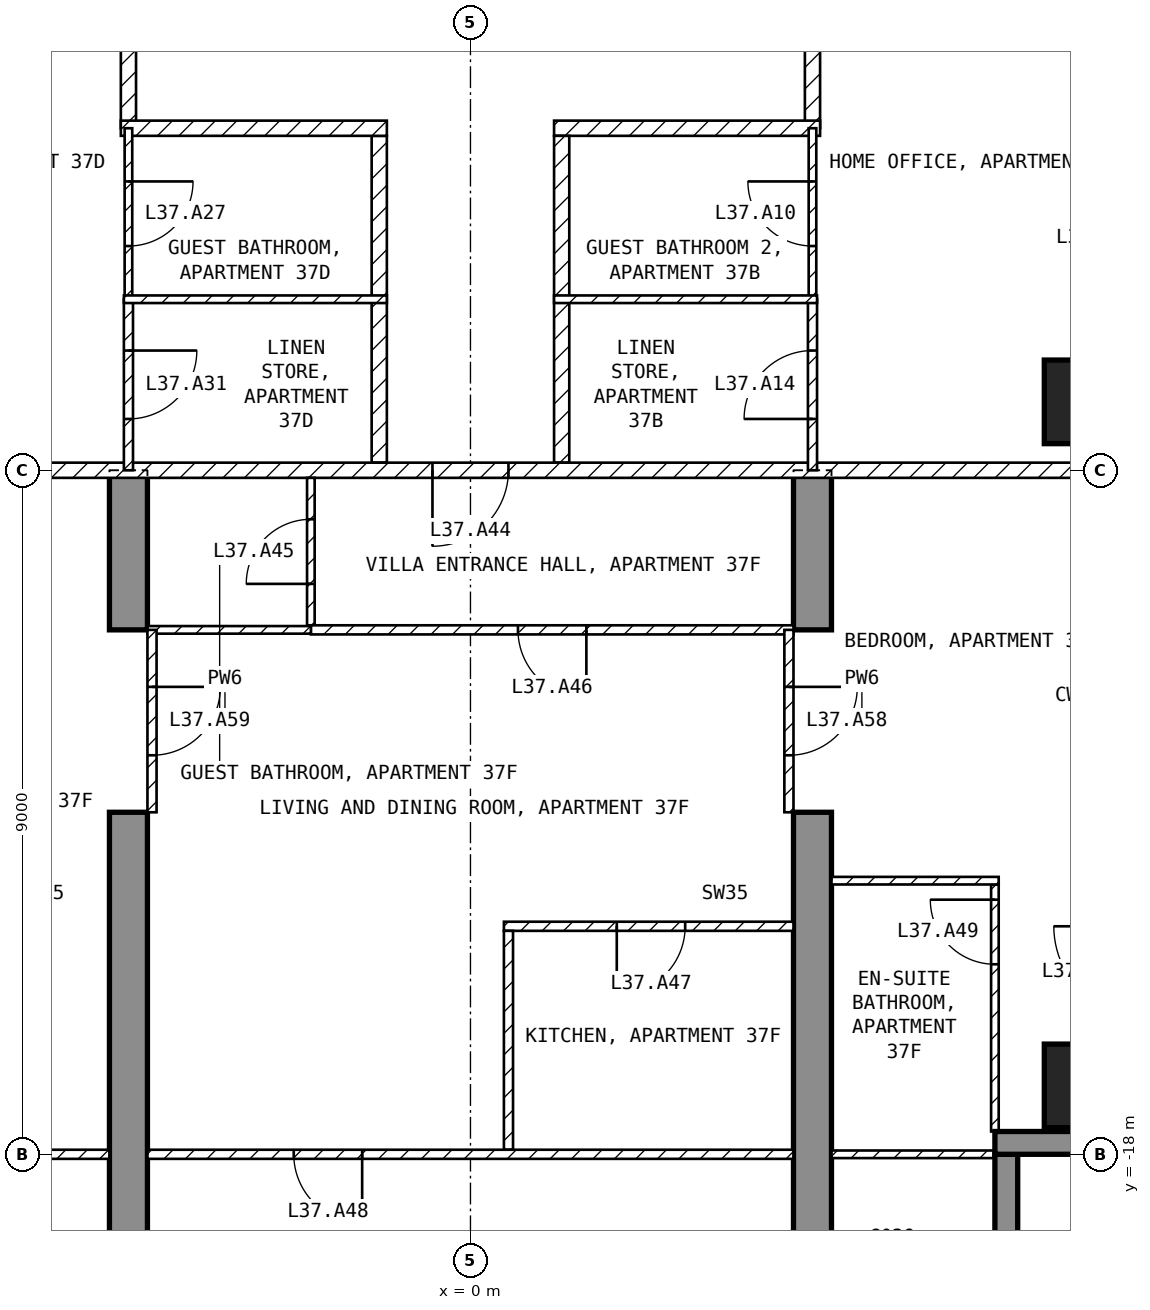
"""IFC4 building model, lengths in metres.
Left out: names, types, materials, properties, quantities, classifications, styles, units other than length and angle.
Written with IfcOpenShell. Run it as: python <this file> out.ifc"""

import sys

from ifc_helpers import new_model, si_unit, direction, frame, frame_2d, origin, origin_2d, place, context, subcontext, project, spatial, polyline, rectangle, outline, extrude, element, fill, save


model = new_model("IFC4")
c1 = context("Model", 3, precision=1e-05, world=origin(), true_north=direction((0.0, 1.0)))
c2 = subcontext(c1, "Body", "Model", "MODEL_VIEW")
j1 = project(units=[si_unit("LENGTHUNIT", "METRE"), si_unit("PLANEANGLEUNIT", "RADIAN")], contexts=[c1])
p1 = place(None, origin())
s1 = spatial("IfcSite", under=j1, at=p1, CompositionType="ELEMENT")
p2 = place(p1, origin())
s2 = spatial("IfcBuilding", under=s1, at=p2, CompositionType="ELEMENT")
p3 = place(p2, frame((0.0, 0.0, 151.4)))
s3 = spatial("IfcBuildingStorey", under=s2, at=p3, CompositionType="ELEMENT", Elevation=151.4)
for number, where, z_axis, x_axis in (
    (1, (8.1, -17.1, -0.25), (0.0, 0.0, 1.0), (1.0, 0.0, 0.0)),
    (2, (8.1, -8.1, -0.25), (0.0, 0.0, 1.0), (1.0, 0.0, 0.0)),
):
    element("IfcColumn", number, at=place(p3, frame(where, z_axis=z_axis, x_axis=x_axis)), inside=s3, PredefinedType="COLUMN", context=c2, shape_type="SweptSolid", body=[
        extrude(rectangle(XDim=1.1, YDim=1.1, at=origin_2d()), origin(), (0.0, 0.0, 1.0), 3.45),
    ])
for number, where, z_axis, x_axis in (
    (3, (-4.75, -20.15, -0.25), (1.0, 0.0, 0.0), (0.0, 1.0, 0.0)),
    (4, (4.25, -20.15, -0.25), (1.0, 0.0, 0.0), (0.0, 1.0, 0.0)),
):
    element("IfcWall", number, at=place(p3, frame(where, z_axis=z_axis, x_axis=x_axis)), inside=s3, PredefinedType="SHEAR", context=c2, shape_type="SweptSolid", body=[
        extrude(outline(polyline([(0.0, 0.0), (6.65, 0.0), (6.65, 2.65), (9.05, 2.65), (9.05, 0.0), (11.15, 0.0), (11.15, 3.45), (0.0, 3.45), (0.0, 0.0)])), origin(), (0.0, 0.0, 1.0), 0.5),
    ])
p4 = place(p3, frame((7.05, -19.8, 0.0), z_axis=(0.0, 0.0, 1.0), x_axis=(0.0, 1.0, 0.0)))
e5 = element("IfcWall", 5, at=p4, inside=s3, PredefinedType="SOLIDWALL", context=c2, shape_type="SweptSolid", body=[
    extrude(rectangle(XDim=1.8, YDim=0.3, at=frame_2d((0.9, 0.0))), origin(), (0.0, 0.0, 1.0), 3.2),
])
p5 = place(p3, frame((6.9, -17.85, 0.0), z_axis=(0.0, 0.0, 1.0), x_axis=(1.0, 0.0, 0.0)))
e6 = element("IfcWall", 6, at=p5, inside=s3, PredefinedType="SOLIDWALL", context=c2, shape_type="SweptSolid", body=[
    extrude(rectangle(XDim=1.85, YDim=0.3, at=frame_2d((0.925, 0.0))), origin(), (0.0, 0.0, 1.0), 3.2),
])
p6 = place(p3, frame((4.5, -1.3, 0.0), z_axis=(0.0, 0.0, 1.0), x_axis=(0.0, -1.0, 0.0)))
e7 = element("IfcWall", 7, at=p6, inside=s3, PredefinedType="PARTITIONING", context=c2, shape_type="SweptSolid", body=[
    extrude(rectangle(XDim=3.2, YDim=0.2, at=frame_2d((1.6, 0.0))), origin(), (0.0, 0.0, 1.0), 3.2),
])
p7 = place(p3, frame((4.6, -4.5, 0.0), z_axis=(0.0, 0.0, 1.0), x_axis=(-1.0, 0.0, 0.0)))
e8 = element("IfcWall", 8, at=p7, inside=s3, PredefinedType="PARTITIONING", context=c2, shape_type="SweptSolid", body=[
    extrude(rectangle(XDim=3.5, YDim=0.2, at=frame_2d((1.75, 0.0))), origin(), (0.0, 0.0, 1.0), 3.2),
])
p8 = place(p3, frame((1.2, -4.6, 0.0), z_axis=(0.0, 0.0, 1.0), x_axis=(0.0, -1.0, 0.0)))
e9 = element("IfcWall", 9, at=p8, inside=s3, PredefinedType="PARTITIONING", context=c2, shape_type="SweptSolid", body=[
    extrude(rectangle(XDim=4.3, YDim=0.2, at=frame_2d((2.15, 0.0))), origin(), (0.0, 0.0, 1.0), 3.2),
])
p9 = place(p3, frame((-4.5, -4.5, 0.0), z_axis=(0.0, 0.0, 1.0), x_axis=(0.0, 1.0, 0.0)))
e10 = element("IfcWall", 10, at=p9, inside=s3, PredefinedType="PARTITIONING", context=c2, shape_type="SweptSolid", body=[
    extrude(rectangle(XDim=3.2, YDim=0.2, at=frame_2d((1.6, 0.0))), origin(), (0.0, 0.0, 1.0), 3.2),
])
p10 = place(p3, frame((-1.2, -8.9, 0.0), z_axis=(0.0, 0.0, 1.0), x_axis=(0.0, 1.0, 0.0)))
e11 = element("IfcWall", 11, at=p10, inside=s3, PredefinedType="PARTITIONING", context=c2, shape_type="SweptSolid", body=[
    extrude(rectangle(XDim=4.3, YDim=0.2, at=frame_2d((2.15, 0.0))), origin(), (0.0, 0.0, 1.0), 3.2),
])
p11 = place(p3, frame((-1.1, -4.5, 0.0), z_axis=(0.0, 0.0, 1.0), x_axis=(-1.0, 0.0, 0.0)))
e12 = element("IfcWall", 12, at=p11, inside=s3, PredefinedType="PARTITIONING", context=c2, shape_type="SweptSolid", body=[
    extrude(rectangle(XDim=3.5, YDim=0.2, at=frame_2d((1.75, 0.0))), origin(), (0.0, 0.0, 1.0), 3.2),
])
p12 = place(p3, frame((8.92, -9.0, 0.0), z_axis=(0.0, 0.0, 1.0), x_axis=(-1.0, 0.0, 0.0)))
e13 = element("IfcWall", 13, at=p12, inside=s3, PredefinedType="PARTITIONING", context=c2, shape_type="SweptSolid", body=[
    extrude(rectangle(XDim=17.84, YDim=0.2, at=frame_2d((8.92, 0.0))), origin(), (0.0, 0.0, 1.0), 3.2),
])
p13 = place(p12, frame((8.42, 0.0, 0.0)))
e14 = element("IfcOpeningElement", 14, at=p13, cuts=e13, PredefinedType="OPENING", context=c2, shape_type="SweptSolid", body=[
    extrude(rectangle(XDim=1.0, YDim=2.1, at=frame_2d((0.5, 1.05))), frame((0.0, 0.11, 0.0), z_axis=(0.0, -1.0, 0.0), x_axis=(1.0, 0.0, 0.0)), (0.0, 0.0, 1.0), 0.22),
])
p14 = place(p3, frame((4.5, -6.75, 0.0), z_axis=(0.0, 0.0, 1.0), x_axis=(0.0, 1.0, 0.0)))
e15 = element("IfcWall", 15, at=p14, inside=s3, PredefinedType="PARTITIONING", context=c2, shape_type="SweptSolid", body=[
    extrude(rectangle(XDim=2.25, YDim=0.1, at=frame_2d((1.125, 0.0))), origin(), (0.0, 0.0, 1.0), 3.2),
])
p15 = place(p14, frame((0.7, 0.0, 0.0)))
e16 = element("IfcOpeningElement", 16, at=p15, cuts=e15, PredefinedType="OPENING", context=c2, shape_type="SweptSolid", body=[
    extrude(rectangle(XDim=0.85, YDim=2.1, at=frame_2d((0.425, 1.05))), frame((0.0, 0.06, 0.0), z_axis=(0.0, -1.0, 0.0), x_axis=(1.0, 0.0, 0.0)), (0.0, 0.0, 1.0), 0.12),
])
p16 = place(p3, frame((4.5, -9.0, 0.0), z_axis=(0.0, 0.0, 1.0), x_axis=(0.0, 1.0, 0.0)))
e17 = element("IfcWall", 17, at=p16, inside=s3, PredefinedType="PARTITIONING", context=c2, shape_type="SweptSolid", body=[
    extrude(rectangle(XDim=2.25, YDim=0.12, at=frame_2d((1.125, 0.0))), origin(), (0.0, 0.0, 1.0), 3.2),
])
p17 = place(p16, frame((0.675, 0.0, 0.0)))
e18 = element("IfcOpeningElement", 18, at=p17, cuts=e17, PredefinedType="OPENING", context=c2, shape_type="SweptSolid", body=[
    extrude(rectangle(XDim=0.9, YDim=2.1, at=frame_2d((0.45, 1.05))), frame((0.0, 0.07, 0.0), z_axis=(0.0, -1.0, 0.0), x_axis=(1.0, 0.0, 0.0)), (0.0, 0.0, 1.0), 0.14),
])
p18 = place(p3, frame((4.56, -6.75, 0.0), z_axis=(0.0, 0.0, 1.0), x_axis=(-1.0, 0.0, 0.0)))
e19 = element("IfcWall", 19, at=p18, inside=s3, PredefinedType="PARTITIONING", context=c2, shape_type="SweptSolid", body=[
    extrude(rectangle(XDim=3.46, YDim=0.1, at=frame_2d((1.73, 0.0))), origin(), (0.0, 0.0, 1.0), 3.2),
])
p19 = place(p3, frame((-4.5, -4.5, 0.0), z_axis=(0.0, 0.0, 1.0), x_axis=(0.0, -1.0, 0.0)))
e20 = element("IfcWall", 20, at=p19, inside=s3, PredefinedType="PARTITIONING", context=c2, shape_type="SweptSolid", body=[
    extrude(rectangle(XDim=2.25, YDim=0.1, at=frame_2d((1.125, 0.0))), origin(), (0.0, 0.0, 1.0), 3.2),
])
p20 = place(p19, frame((0.7, 0.0, 0.0)))
e21 = element("IfcOpeningElement", 21, at=p20, cuts=e20, PredefinedType="OPENING", context=c2, shape_type="SweptSolid", body=[
    extrude(rectangle(XDim=0.85, YDim=2.1, at=frame_2d((0.425, 1.05))), frame((0.0, 0.06, 0.0), z_axis=(0.0, -1.0, 0.0), x_axis=(1.0, 0.0, 0.0)), (0.0, 0.0, 1.0), 0.12),
])
p21 = place(p3, frame((-4.5, -6.75, 0.0), z_axis=(0.0, 0.0, 1.0), x_axis=(0.0, -1.0, 0.0)))
e22 = element("IfcWall", 22, at=p21, inside=s3, PredefinedType="PARTITIONING", context=c2, shape_type="SweptSolid", body=[
    extrude(rectangle(XDim=2.25, YDim=0.12, at=frame_2d((1.125, 0.0))), origin(), (0.0, 0.0, 1.0), 3.2),
])
p22 = place(p21, frame((0.675, 0.0, 0.0)))
e23 = element("IfcOpeningElement", 23, at=p22, cuts=e22, PredefinedType="OPENING", context=c2, shape_type="SweptSolid", body=[
    extrude(rectangle(XDim=0.9, YDim=2.1, at=frame_2d((0.45, 1.05))), frame((0.0, 0.07, 0.0), z_axis=(0.0, -1.0, 0.0), x_axis=(1.0, 0.0, 0.0)), (0.0, 0.0, 1.0), 0.14),
])
p23 = place(p3, frame((-1.1, -6.75, 0.0), z_axis=(0.0, 0.0, 1.0), x_axis=(-1.0, 0.0, 0.0)))
e24 = element("IfcWall", 24, at=p23, inside=s3, PredefinedType="PARTITIONING", context=c2, shape_type="SweptSolid", body=[
    extrude(rectangle(XDim=3.46, YDim=0.1, at=frame_2d((1.73, 0.0))), origin(), (0.0, 0.0, 1.0), 3.2),
])
p24 = place(p3, frame((-2.1, -11.04, 0.0), z_axis=(0.0, 0.0, 1.0), x_axis=(0.0, 1.0, 0.0)))
e25 = element("IfcWall", 25, at=p24, inside=s3, PredefinedType="PARTITIONING", context=c2, shape_type="SweptSolid", body=[
    extrude(rectangle(XDim=1.94, YDim=0.1, at=frame_2d((0.97, 0.0))), origin(), (0.0, 0.0, 1.0), 3.2),
])
p25 = place(p24, frame((0.545, 0.0, 0.0)))
e26 = element("IfcOpeningElement", 26, at=p25, cuts=e25, PredefinedType="OPENING", context=c2, shape_type="SweptSolid", body=[
    extrude(rectangle(XDim=0.85, YDim=2.1, at=frame_2d((0.425, 1.05))), frame((0.0, 0.06, 0.0), z_axis=(0.0, -1.0, 0.0), x_axis=(1.0, 0.0, 0.0)), (0.0, 0.0, 1.0), 0.12),
])
p26 = place(p3, frame((4.25, -11.1, 0.0), z_axis=(0.0, 0.0, 1.0), x_axis=(-1.0, 0.0, 0.0)))
e27 = element("IfcWall", 27, at=p26, inside=s3, PredefinedType="PARTITIONING", context=c2, shape_type="SweptSolid", body=[
    extrude(rectangle(XDim=6.35, YDim=0.12, at=frame_2d((3.175, 0.0))), origin(), (0.0, 0.0, 1.0), 3.2),
])
p27 = place(p26, frame((2.725, 0.0, 0.0)))
e28 = element("IfcOpeningElement", 28, at=p27, cuts=e27, PredefinedType="OPENING", context=c2, shape_type="SweptSolid", body=[
    extrude(rectangle(XDim=0.9, YDim=2.1, at=frame_2d((0.45, 1.05))), frame((0.0, 0.07, 0.0), z_axis=(0.0, -1.0, 0.0), x_axis=(1.0, 0.0, 0.0)), (0.0, 0.0, 1.0), 0.14),
])
p28 = place(p3, frame((-2.1, -11.1, 0.0), z_axis=(0.0, 0.0, 1.0), x_axis=(-1.0, 0.0, 0.0)))
e29 = element("IfcWall", 29, at=p28, inside=s3, PredefinedType="PARTITIONING", context=c2, shape_type="SweptSolid", body=[
    extrude(rectangle(XDim=2.15, YDim=0.1, at=frame_2d((1.075, 0.0))), origin(), (0.0, 0.0, 1.0), 3.2),
])
p29 = place(p3, frame((4.25, -15.0, 0.0), z_axis=(0.0, 0.0, 1.0), x_axis=(-1.0, 0.0, 0.0)))
e30 = element("IfcWall", 30, at=p29, inside=s3, PredefinedType="PARTITIONING", context=c2, shape_type="SweptSolid", body=[
    extrude(rectangle(XDim=3.81, YDim=0.12, at=frame_2d((1.905, 0.0))), origin(), (0.0, 0.0, 1.0), 3.2),
])
p30 = place(p29, frame((1.425, 0.0, 0.0)))
e31 = element("IfcOpeningElement", 31, at=p30, cuts=e30, PredefinedType="OPENING", context=c2, shape_type="SweptSolid", body=[
    extrude(rectangle(XDim=0.9, YDim=2.1, at=frame_2d((0.45, 1.05))), frame((0.0, 0.07, 0.0), z_axis=(0.0, -1.0, 0.0), x_axis=(1.0, 0.0, 0.0)), (0.0, 0.0, 1.0), 0.14),
])
p31 = place(p3, frame((0.5, -15.06, 0.0), z_axis=(0.0, 0.0, 1.0), x_axis=(0.0, -1.0, 0.0)))
e32 = element("IfcWall", 32, at=p31, inside=s3, PredefinedType="PARTITIONING", context=c2, shape_type="SweptSolid", body=[
    extrude(rectangle(XDim=2.88, YDim=0.12, at=frame_2d((1.44, 0.0))), origin(), (0.0, 0.0, 1.0), 3.2),
])
p32 = place(p3, frame((4.25, -18.0, 0.0), z_axis=(0.0, 0.0, 1.0), x_axis=(-1.0, 0.0, 0.0)))
e33 = element("IfcWall", 33, at=p32, inside=s3, PredefinedType="PARTITIONING", context=c2, shape_type="SweptSolid", body=[
    extrude(rectangle(XDim=8.5, YDim=0.12, at=frame_2d((4.25, 0.0))), origin(), (0.0, 0.0, 1.0), 3.2),
])
p33 = place(p32, frame((5.675, 0.0, 0.0)))
e34 = element("IfcOpeningElement", 34, at=p33, cuts=e33, PredefinedType="OPENING", context=c2, shape_type="SweptSolid", body=[
    extrude(rectangle(XDim=0.9, YDim=2.1, at=frame_2d((0.45, 1.05))), frame((0.0, 0.07, 0.0), z_axis=(0.0, -1.0, 0.0), x_axis=(1.0, 0.0, 0.0)), (0.0, 0.0, 1.0), 0.14),
])
p34 = place(p3, frame((6.9, -17.7, 0.0), z_axis=(0.0, 0.0, 1.0), x_axis=(0.0, 1.0, 0.0)))
e35 = element("IfcWall", 35, at=p34, inside=s3, PredefinedType="PARTITIONING", context=c2, shape_type="SweptSolid", body=[
    extrude(rectangle(XDim=3.25, YDim=0.1, at=frame_2d((1.625, 0.0))), origin(), (0.0, 0.0, 1.0), 3.2),
])
p35 = place(p34, frame((2.2, 0.0, 0.0)))
e36 = element("IfcOpeningElement", 36, at=p35, cuts=e35, PredefinedType="OPENING", context=c2, shape_type="SweptSolid", body=[
    extrude(rectangle(XDim=0.85, YDim=2.1, at=frame_2d((0.425, 1.05))), frame((0.0, 0.06, 0.0), z_axis=(0.0, -1.0, 0.0), x_axis=(1.0, 0.0, 0.0)), (0.0, 0.0, 1.0), 0.12),
])
p36 = place(p3, frame((6.95, -14.4, 0.0), z_axis=(0.0, 0.0, 1.0), x_axis=(-1.0, 0.0, 0.0)))
e37 = element("IfcWall", 37, at=p36, inside=s3, PredefinedType="PARTITIONING", context=c2, shape_type="SweptSolid", body=[
    extrude(rectangle(XDim=2.2, YDim=0.1, at=frame_2d((1.1, 0.0))), origin(), (0.0, 0.0, 1.0), 3.2),
])
p37 = place(p3, frame((7.12, -18.0, 0.0), z_axis=(0.0, 0.0, 1.0), x_axis=(-1.0, 0.0, 0.0)))
e38 = element("IfcWall", 38, at=p37, inside=s3, PredefinedType="PARTITIONING", context=c2, shape_type="SweptSolid", body=[
    extrude(rectangle(XDim=2.37, YDim=0.1, at=frame_2d((1.185, 0.0))), origin(), (0.0, 0.0, 1.0), 3.2),
])
p38 = place(p3, frame((-4.75, -18.0, 0.0), z_axis=(0.0, 0.0, 1.0), x_axis=(-1.0, 0.0, 0.0)))
e39 = element("IfcWall", 39, at=p38, inside=s3, PredefinedType="PARTITIONING", context=c2, shape_type="SweptSolid", body=[
    extrude(rectangle(XDim=2.37, YDim=0.12, at=frame_2d((1.185, 0.0))), origin(), (0.0, 0.0, 1.0), 3.2),
])
p39 = place(p3, frame((4.19, -11.1, 0.0), z_axis=(0.0, 0.0, 1.0), x_axis=(0.0, -1.0, 0.0)))
e40 = element("IfcWall", 40, at=p39, inside=s3, PredefinedType="PARTITIONING", context=c2, shape_type="SweptSolid", body=[
    extrude(rectangle(XDim=2.4, YDim=0.12, at=frame_2d((1.2, 0.0))), origin(), (0.0, 0.0, 1.0), 2.4),
])
p40 = place(p39, frame((0.75, 0.0, 0.0)))
e41 = element("IfcOpeningElement", 41, at=p40, cuts=e40, PredefinedType="OPENING", context=c2, shape_type="SweptSolid", body=[
    extrude(rectangle(XDim=0.9, YDim=2.1, at=frame_2d((0.45, 1.05))), frame((0.0, 0.07, 0.0), z_axis=(0.0, -1.0, 0.0), x_axis=(1.0, 0.0, 0.0)), (0.0, 0.0, 1.0), 0.14),
])
p41 = place(p3, frame((-4.19, -11.1, 0.0), z_axis=(0.0, 0.0, 1.0), x_axis=(0.0, -1.0, 0.0)))
e42 = element("IfcWall", 42, at=p41, inside=s3, PredefinedType="PARTITIONING", context=c2, shape_type="SweptSolid", body=[
    extrude(rectangle(XDim=2.4, YDim=0.12, at=frame_2d((1.2, 0.0))), origin(), (0.0, 0.0, 1.0), 2.4),
])
p42 = place(p41, frame((0.75, 0.0, 0.0)))
e43 = element("IfcOpeningElement", 43, at=p42, cuts=e42, PredefinedType="OPENING", context=c2, shape_type="SweptSolid", body=[
    extrude(rectangle(XDim=0.9, YDim=2.1, at=frame_2d((0.45, 1.05))), frame((0.0, 0.07, 0.0), z_axis=(0.0, -1.0, 0.0), x_axis=(1.0, 0.0, 0.0)), (0.0, 0.0, 1.0), 0.14),
])
p43 = place(p15, origin())
e44 = element("IfcDoor", 44, at=p43, inside=s3, OperationType="SINGLE_SWING_RIGHT", PredefinedType="DOOR", context=c2, shape_type="SweptSolid", body=[
    extrude(rectangle(XDim=0.85, YDim=2.1, at=frame_2d((0.425, 1.05))), frame((0.0, 0.025, 0.0), z_axis=(0.0, -1.0, 0.0), x_axis=(1.0, 0.0, 0.0)), (0.0, 0.0, 1.0), 0.05),
])
fill(e16, e44)
p44 = place(p17, origin())
e45 = element("IfcDoor", 45, at=p44, inside=s3, OperationType="SINGLE_SWING_LEFT", PredefinedType="DOOR", context=c2, shape_type="SweptSolid", body=[
    extrude(rectangle(XDim=0.9, YDim=2.1, at=frame_2d((0.45, 1.05))), frame((0.0, 0.025, 0.0), z_axis=(0.0, -1.0, 0.0), x_axis=(1.0, 0.0, 0.0)), (0.0, 0.0, 1.0), 0.05),
])
fill(e18, e45)
p45 = place(p20, origin())
e46 = element("IfcDoor", 46, at=p45, inside=s3, OperationType="SINGLE_SWING_LEFT", PredefinedType="DOOR", context=c2, shape_type="SweptSolid", body=[
    extrude(rectangle(XDim=0.85, YDim=2.1, at=frame_2d((0.425, 1.05))), frame((0.0, 0.025, 0.0), z_axis=(0.0, -1.0, 0.0), x_axis=(1.0, 0.0, 0.0)), (0.0, 0.0, 1.0), 0.05),
])
fill(e21, e46)
p46 = place(p22, origin())
e47 = element("IfcDoor", 47, at=p46, inside=s3, OperationType="SINGLE_SWING_LEFT", PredefinedType="DOOR", context=c2, shape_type="SweptSolid", body=[
    extrude(rectangle(XDim=0.9, YDim=2.1, at=frame_2d((0.45, 1.05))), frame((0.0, 0.025, 0.0), z_axis=(0.0, -1.0, 0.0), x_axis=(1.0, 0.0, 0.0)), (0.0, 0.0, 1.0), 0.05),
])
fill(e23, e47)
p47 = place(p13, origin())
e48 = element("IfcDoor", 48, at=p47, inside=s3, OperationType="SINGLE_SWING_RIGHT", PredefinedType="DOOR", context=c2, shape_type="SweptSolid", body=[
    extrude(rectangle(XDim=1.0, YDim=2.1, at=frame_2d((0.5, 1.05))), frame((0.0, 0.025, 0.0), z_axis=(0.0, -1.0, 0.0), x_axis=(1.0, 0.0, 0.0)), (0.0, 0.0, 1.0), 0.05),
])
fill(e14, e48)
p48 = place(p25, origin())
e49 = element("IfcDoor", 49, at=p48, inside=s3, OperationType="SINGLE_SWING_LEFT", PredefinedType="DOOR", context=c2, shape_type="SweptSolid", body=[
    extrude(rectangle(XDim=0.85, YDim=2.1, at=frame_2d((0.425, 1.05))), frame((0.0, 0.025, 0.0), z_axis=(0.0, -1.0, 0.0), x_axis=(1.0, 0.0, 0.0)), (0.0, 0.0, 1.0), 0.05),
])
fill(e26, e49)
p49 = place(p27, origin())
e50 = element("IfcDoor", 50, at=p49, inside=s3, OperationType="SINGLE_SWING_LEFT", PredefinedType="DOOR", context=c2, shape_type="SweptSolid", body=[
    extrude(rectangle(XDim=0.9, YDim=2.1, at=frame_2d((0.45, 1.05))), frame((0.0, 0.025, 0.0), z_axis=(0.0, -1.0, 0.0), x_axis=(1.0, 0.0, 0.0)), (0.0, 0.0, 1.0), 0.05),
])
fill(e28, e50)
p50 = place(p30, origin())
e51 = element("IfcDoor", 51, at=p50, inside=s3, OperationType="SINGLE_SWING_RIGHT", PredefinedType="DOOR", context=c2, shape_type="SweptSolid", body=[
    extrude(rectangle(XDim=0.9, YDim=2.1, at=frame_2d((0.45, 1.05))), frame((0.0, 0.025, 0.0), z_axis=(0.0, -1.0, 0.0), x_axis=(1.0, 0.0, 0.0)), (0.0, 0.0, 1.0), 0.05),
])
fill(e31, e51)
p51 = place(p33, origin())
e52 = element("IfcDoor", 52, at=p51, inside=s3, OperationType="SINGLE_SWING_LEFT", PredefinedType="DOOR", context=c2, shape_type="SweptSolid", body=[
    extrude(rectangle(XDim=0.9, YDim=2.1, at=frame_2d((0.45, 1.05))), frame((0.0, 0.025, 0.0), z_axis=(0.0, -1.0, 0.0), x_axis=(1.0, 0.0, 0.0)), (0.0, 0.0, 1.0), 0.05),
])
fill(e34, e52)
p52 = place(p35, origin())
e53 = element("IfcDoor", 53, at=p52, inside=s3, OperationType="SINGLE_SWING_RIGHT", PredefinedType="DOOR", context=c2, shape_type="SweptSolid", body=[
    extrude(rectangle(XDim=0.85, YDim=2.1, at=frame_2d((0.425, 1.05))), frame((0.0, 0.025, 0.0), z_axis=(0.0, -1.0, 0.0), x_axis=(1.0, 0.0, 0.0)), (0.0, 0.0, 1.0), 0.05),
])
fill(e36, e53)
p53 = place(p40, origin())
e54 = element("IfcDoor", 54, at=p53, inside=s3, OperationType="SINGLE_SWING_LEFT", PredefinedType="DOOR", context=c2, shape_type="SweptSolid", body=[
    extrude(rectangle(XDim=0.9, YDim=2.1, at=frame_2d((0.45, 1.05))), frame((0.0, 0.025, 0.0), z_axis=(0.0, -1.0, 0.0), x_axis=(1.0, 0.0, 0.0)), (0.0, 0.0, 1.0), 0.05),
])
fill(e41, e54)
p54 = place(p42, origin())
e55 = element("IfcDoor", 55, at=p54, inside=s3, OperationType="SINGLE_SWING_LEFT", PredefinedType="DOOR", context=c2, shape_type="SweptSolid", body=[
    extrude(rectangle(XDim=0.9, YDim=2.1, at=frame_2d((0.45, 1.05))), frame((0.0, 0.025, 0.0), z_axis=(0.0, -1.0, 0.0), x_axis=(1.0, 0.0, 0.0)), (0.0, 0.0, 1.0), 0.05),
])
fill(e43, e55)
save(model, sys.argv[1])
